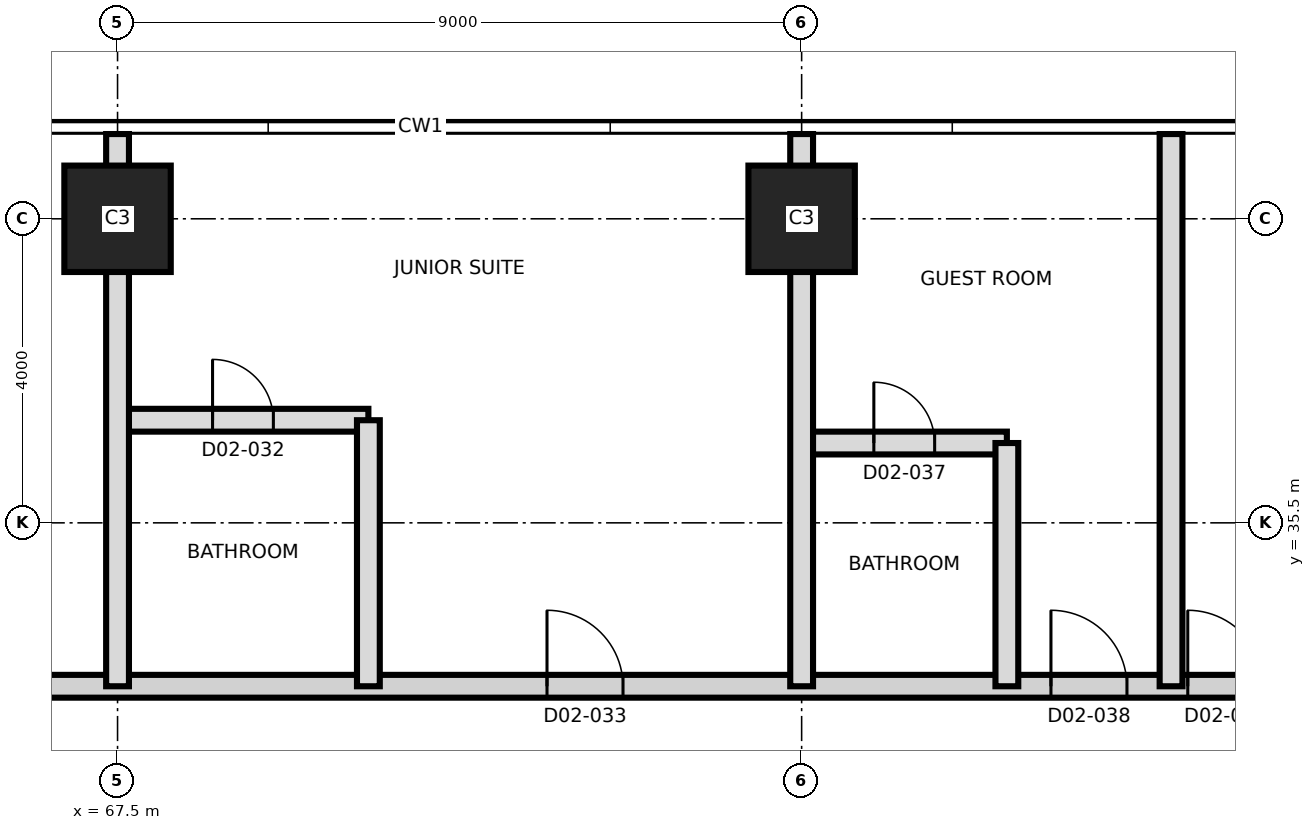
"""IFC4 building model, lengths in metres.
Left out: names, types, materials, properties, quantities, classifications, styles, units other than length and angle.
Written with IfcOpenShell. Run it as: python <this file> out.ifc"""

import sys

from ifc_helpers import new_model, si_unit, direction, frame, frame_2d, origin, origin_2d, place, context, subcontext, project, spatial, rectangle, extrude, element, fill, save


model = new_model("IFC4")
c1 = context("Model", 3, precision=1e-05, world=origin(), true_north=direction((0.0, 1.0)))
c2 = subcontext(c1, "Body", "Model", "MODEL_VIEW")
j1 = project(units=[si_unit("LENGTHUNIT", "METRE"), si_unit("PLANEANGLEUNIT", "RADIAN")], contexts=[c1])
p1 = place(None, origin())
s1 = spatial("IfcSite", under=j1, at=p1, CompositionType="ELEMENT")
p2 = place(p1, origin())
s2 = spatial("IfcBuilding", under=s1, at=p2, CompositionType="ELEMENT")
p3 = place(p2, frame((0.0, 0.0, 48.3)))
s3 = spatial("IfcBuildingStorey", under=s2, at=p3, CompositionType="ELEMENT", Elevation=48.3)
for number, where, z_axis, x_axis in (
    (1, (67.5, 39.5, 0.0), (0.0, 0.0, 1.0), (1.0, 0.0, 0.0)),
    (2, (76.5, 39.5, 0.0), (0.0, 0.0, 1.0), (1.0, 0.0, 0.0)),
):
    element("IfcColumn", number, at=place(p3, frame(where, z_axis=z_axis, x_axis=x_axis)), inside=s3, PredefinedType="COLUMN", context=c2, shape_type="SweptSolid", body=[
        extrude(rectangle(XDim=1.4, YDim=1.4, at=origin_2d()), origin(), (0.0, 0.0, 1.0), 3.7),
    ])
p4 = place(p3, frame((58.95, 33.35, 0.0), z_axis=(0.0, 0.0, 1.0), x_axis=(1.0, 0.0, 0.0)))
e3 = element("IfcWall", 3, at=p4, inside=s3, PredefinedType="PARTITIONING", context=c2, shape_type="SweptSolid", body=[
    extrude(rectangle(XDim=26.38, YDim=0.3, at=frame_2d((13.19, 0.0))), origin(), (0.0, 0.0, 1.0), 3.4),
])
p5 = place(p4, frame((2.6, 0.0, 0.0)))
e4 = element("IfcOpeningElement", 4, at=p5, cuts=e3, PredefinedType="OPENING", context=c2, shape_type="SweptSolid", body=[
    extrude(rectangle(XDim=1.0, YDim=2.1, at=frame_2d((0.5, 1.05))), frame((0.0, 0.16, 0.0), z_axis=(0.0, -1.0, 0.0), x_axis=(1.0, 0.0, 0.0)), (0.0, 0.0, 1.0), 0.32),
])
p6 = place(p4, frame((5.55, 0.0, 0.0)))
e5 = element("IfcOpeningElement", 5, at=p6, cuts=e3, PredefinedType="OPENING", context=c2, shape_type="SweptSolid", body=[
    extrude(rectangle(XDim=1.4, YDim=2.1, at=frame_2d((0.7, 1.05))), frame((0.0, 0.16, 0.0), z_axis=(0.0, -1.0, 0.0), x_axis=(1.0, 0.0, 0.0)), (0.0, 0.0, 1.0), 0.32),
])
p7 = place(p4, frame((14.2, 0.0, 0.0)))
e6 = element("IfcOpeningElement", 6, at=p7, cuts=e3, PredefinedType="OPENING", context=c2, shape_type="SweptSolid", body=[
    extrude(rectangle(XDim=1.0, YDim=2.4, at=frame_2d((0.5, 1.2))), frame((0.0, 0.16, 0.0), z_axis=(0.0, -1.0, 0.0), x_axis=(1.0, 0.0, 0.0)), (0.0, 0.0, 1.0), 0.32),
])
p8 = place(p4, frame((20.83, 0.0, 0.0)))
e7 = element("IfcOpeningElement", 7, at=p8, cuts=e3, PredefinedType="OPENING", context=c2, shape_type="SweptSolid", body=[
    extrude(rectangle(XDim=1.0, YDim=2.1, at=frame_2d((0.5, 1.05))), frame((0.0, 0.16, 0.0), z_axis=(0.0, -1.0, 0.0), x_axis=(1.0, 0.0, 0.0)), (0.0, 0.0, 1.0), 0.32),
])
p9 = place(p4, frame((22.63, 0.0, 0.0)))
e8 = element("IfcOpeningElement", 8, at=p9, cuts=e3, PredefinedType="OPENING", context=c2, shape_type="SweptSolid", body=[
    extrude(rectangle(XDim=1.0, YDim=2.1, at=frame_2d((0.5, 1.05))), frame((0.0, 0.16, 0.0), z_axis=(0.0, -1.0, 0.0), x_axis=(1.0, 0.0, 0.0)), (0.0, 0.0, 1.0), 0.32),
])
p10 = place(p3, frame((76.5, 36.55, 0.0), z_axis=(0.0, 0.0, 1.0), x_axis=(1.0, 0.0, 0.0)))
e9 = element("IfcWall", 9, at=p10, inside=s3, PredefinedType="PARTITIONING", context=c2, shape_type="SweptSolid", body=[
    extrude(rectangle(XDim=2.7, YDim=0.3, at=frame_2d((1.35, 0.0))), origin(), (0.0, 0.0, 1.0), 3.4),
])
p11 = place(p10, frame((0.95, 0.0, 0.0)))
e10 = element("IfcOpeningElement", 10, at=p11, cuts=e9, PredefinedType="OPENING", context=c2, shape_type="SweptSolid", body=[
    extrude(rectangle(XDim=0.8, YDim=2.1, at=frame_2d((0.4, 1.05))), frame((0.0, 0.16, 0.0), z_axis=(0.0, -1.0, 0.0), x_axis=(1.0, 0.0, 0.0)), (0.0, 0.0, 1.0), 0.32),
])
p12 = place(p3, frame((67.5, 36.85, 0.0), z_axis=(0.0, 0.0, 1.0), x_axis=(1.0, 0.0, 0.0)))
e11 = element("IfcWall", 11, at=p12, inside=s3, PredefinedType="PARTITIONING", context=c2, shape_type="SweptSolid", body=[
    extrude(rectangle(XDim=3.3, YDim=0.3, at=frame_2d((1.65, 0.0))), origin(), (0.0, 0.0, 1.0), 3.4),
])
p13 = place(p12, frame((1.25, 0.0, 0.0)))
e12 = element("IfcOpeningElement", 12, at=p13, cuts=e11, PredefinedType="OPENING", context=c2, shape_type="SweptSolid", body=[
    extrude(rectangle(XDim=0.8, YDim=2.1, at=frame_2d((0.4, 1.05))), frame((0.0, 0.16, 0.0), z_axis=(0.0, -1.0, 0.0), x_axis=(1.0, 0.0, 0.0)), (0.0, 0.0, 1.0), 0.32),
])
p14 = place(p3, frame((67.5, 33.35, 0.0), z_axis=(0.0, 0.0, 1.0), x_axis=(0.0, 1.0, 0.0)))
e13 = element("IfcWall", 13, at=p14, inside=s3, PredefinedType="PARTITIONING", context=c2, shape_type="SweptSolid", body=[
    extrude(rectangle(XDim=7.265, YDim=0.3, at=frame_2d((3.632, 0.0))), origin(), (0.0, 0.0, 1.0), 3.4),
])
p15 = place(p3, frame((70.8, 33.35, 0.0), z_axis=(0.0, 0.0, 1.0), x_axis=(0.0, 1.0, 0.0)))
e14 = element("IfcWall", 14, at=p15, inside=s3, PredefinedType="PARTITIONING", context=c2, shape_type="SweptSolid", body=[
    extrude(rectangle(XDim=3.5, YDim=0.3, at=frame_2d((1.75, 0.0))), origin(), (0.0, 0.0, 1.0), 3.4),
])
p16 = place(p3, frame((76.5, 33.35, 0.0), z_axis=(0.0, 0.0, 1.0), x_axis=(0.0, 1.0, 0.0)))
e15 = element("IfcWall", 15, at=p16, inside=s3, PredefinedType="PARTITIONING", context=c2, shape_type="SweptSolid", body=[
    extrude(rectangle(XDim=7.265, YDim=0.3, at=frame_2d((3.632, 0.0))), origin(), (0.0, 0.0, 1.0), 3.4),
])
p17 = place(p3, frame((79.2, 33.35, 0.0), z_axis=(0.0, 0.0, 1.0), x_axis=(0.0, 1.0, 0.0)))
e16 = element("IfcWall", 16, at=p17, inside=s3, PredefinedType="PARTITIONING", context=c2, shape_type="SweptSolid", body=[
    extrude(rectangle(XDim=3.2, YDim=0.3, at=frame_2d((1.6, 0.0))), origin(), (0.0, 0.0, 1.0), 3.4),
])
p18 = place(p3, frame((81.36, 33.35, 0.0), z_axis=(0.0, 0.0, 1.0), x_axis=(0.0, 1.0, 0.0)))
e17 = element("IfcWall", 17, at=p18, inside=s3, PredefinedType="PARTITIONING", context=c2, shape_type="SweptSolid", body=[
    extrude(rectangle(XDim=7.265, YDim=0.3, at=frame_2d((3.632, 0.0))), origin(), (0.0, 0.0, 1.0), 3.4),
])
p19 = place(p13, origin())
e18 = element("IfcDoor", 18, at=p19, inside=s3, OperationType="SINGLE_SWING_LEFT", PredefinedType="DOOR", context=c2, shape_type="SweptSolid", body=[
    extrude(rectangle(XDim=0.8, YDim=2.1, at=frame_2d((0.4, 1.05))), frame((0.0, 0.025, 0.0), z_axis=(0.0, -1.0, 0.0), x_axis=(1.0, 0.0, 0.0)), (0.0, 0.0, 1.0), 0.05),
])
fill(e12, e18)
p20 = place(p7, origin())
e19 = element("IfcDoor", 19, at=p20, inside=s3, OperationType="SINGLE_SWING_LEFT", PredefinedType="DOOR", context=c2, shape_type="SweptSolid", body=[
    extrude(rectangle(XDim=1.0, YDim=2.4, at=frame_2d((0.5, 1.2))), frame((0.0, 0.025, 0.0), z_axis=(0.0, -1.0, 0.0), x_axis=(1.0, 0.0, 0.0)), (0.0, 0.0, 1.0), 0.05),
])
fill(e6, e19)
p21 = place(p11, origin())
e20 = element("IfcDoor", 20, at=p21, inside=s3, OperationType="SINGLE_SWING_LEFT", PredefinedType="DOOR", context=c2, shape_type="SweptSolid", body=[
    extrude(rectangle(XDim=0.8, YDim=2.1, at=frame_2d((0.4, 1.05))), frame((0.0, 0.025, 0.0), z_axis=(0.0, -1.0, 0.0), x_axis=(1.0, 0.0, 0.0)), (0.0, 0.0, 1.0), 0.05),
])
fill(e10, e20)
p22 = place(p8, origin())
e21 = element("IfcDoor", 21, at=p22, inside=s3, OperationType="SINGLE_SWING_RIGHT", PredefinedType="DOOR", context=c2, shape_type="SweptSolid", body=[
    extrude(rectangle(XDim=1.0, YDim=2.1, at=frame_2d((0.5, 1.05))), frame((0.0, 0.025, 0.0), z_axis=(0.0, -1.0, 0.0), x_axis=(1.0, 0.0, 0.0)), (0.0, 0.0, 1.0), 0.05),
])
fill(e7, e21)
p23 = place(p9, origin())
e22 = element("IfcDoor", 22, at=p23, inside=s3, OperationType="SINGLE_SWING_LEFT", PredefinedType="DOOR", context=c2, shape_type="SweptSolid", body=[
    extrude(rectangle(XDim=1.0, YDim=2.1, at=frame_2d((0.5, 1.05))), frame((0.0, 0.025, 0.0), z_axis=(0.0, -1.0, 0.0), x_axis=(1.0, 0.0, 0.0)), (0.0, 0.0, 1.0), 0.05),
])
fill(e8, e22)
save(model, sys.argv[1])
